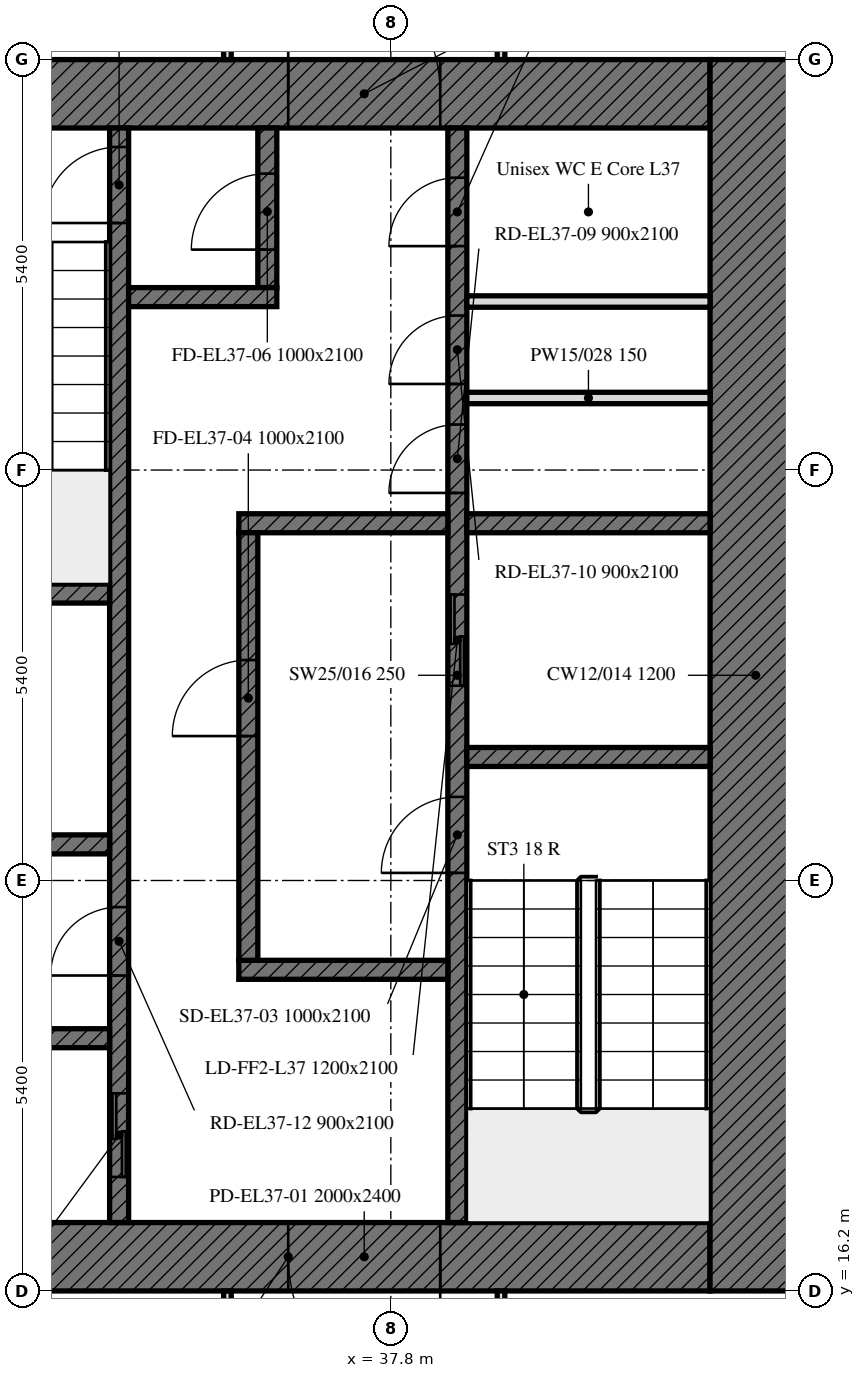
"""IFC4 building model, lengths in metres.
Left out: names, types, materials, properties, quantities, classifications, styles, units other than length and angle.
Written with IfcOpenShell. Run it as: python <this file> out.ifc"""

import sys

from ifc_helpers import new_model, si_unit, direction, frame, frame_2d, origin, place, context, subcontext, project, spatial, rectangle, extrude, element, fill, save


model = new_model("IFC4")
c1 = context("Model", 3, precision=1e-05, world=origin(), true_north=direction((0.0, 1.0)))
c2 = subcontext(c1, "Body", "Model", "MODEL_VIEW")
j1 = project(units=[si_unit("LENGTHUNIT", "METRE"), si_unit("PLANEANGLEUNIT", "RADIAN")], contexts=[c1])
p1 = place(None, origin())
s1 = spatial("IfcSite", under=j1, at=p1, CompositionType="ELEMENT")
p2 = place(p1, origin())
s2 = spatial("IfcBuilding", under=s1, at=p2, CompositionType="ELEMENT")
p3 = place(p2, frame((0.0, 0.0, 159.4)))
s3 = spatial("IfcBuildingStorey", under=s2, at=p3, CompositionType="ELEMENT", Elevation=159.4)
p4 = place(p3, frame((42.0, 16.65, 0.0), z_axis=(0.0, 0.0, 1.0), x_axis=(-1.0, 0.0, 0.0)))
e1 = element("IfcWall", 1, at=p4, inside=s3, PredefinedType="SOLIDWALL", context=c2, shape_type="SweptSolid", body=[
    extrude(rectangle(XDim=11.1, YDim=0.9, at=frame_2d((5.55, 0.0))), origin(), (0.0, 0.0, 1.0), 3.0),
])
p5 = place(p4, frame((3.55, 0.0, 0.0)))
e2 = element("IfcOpeningElement", 2, at=p5, cuts=e1, PredefinedType="OPENING", context=c2, shape_type="SweptSolid", body=[
    extrude(rectangle(XDim=2.0, YDim=2.4, at=frame_2d((1.0, 1.2))), frame((0.0, 0.45, 0.0), z_axis=(0.0, -1.0, 0.0), x_axis=(1.0, 0.0, 0.0)), (0.0, 0.0, 1.0), 0.9),
])
p6 = place(p3, frame((30.9, 31.95, 0.0), z_axis=(0.0, 0.0, 1.0), x_axis=(1.0, 0.0, 0.0)))
e3 = element("IfcWall", 3, at=p6, inside=s3, PredefinedType="SOLIDWALL", context=c2, shape_type="SweptSolid", body=[
    extrude(rectangle(XDim=11.1, YDim=0.9, at=frame_2d((5.55, 0.0))), origin(), (0.0, 0.0, 1.0), 3.0),
])
p7 = place(p6, frame((5.55, 0.0, 0.0)))
e4 = element("IfcOpeningElement", 4, at=p7, cuts=e3, PredefinedType="OPENING", context=c2, shape_type="SweptSolid", body=[
    extrude(rectangle(XDim=2.0, YDim=2.4, at=frame_2d((1.0, 1.2))), frame((0.0, 0.45, 0.0), z_axis=(0.0, -1.0, 0.0), x_axis=(1.0, 0.0, 0.0)), (0.0, 0.0, 1.0), 0.9),
])
p8 = place(p3, frame((42.6, 32.4, 0.0), z_axis=(0.0, 0.0, 1.0), x_axis=(0.0, -1.0, 0.0)))
e5 = element("IfcWall", 5, at=p8, inside=s3, PredefinedType="SOLIDWALL", context=c2, shape_type="SweptSolid", body=[
    extrude(rectangle(XDim=16.2, YDim=1.2, at=frame_2d((8.1, 0.0))), origin(), (0.0, 0.0, 1.0), 3.0),
])
p9 = place(p3, frame((38.675, 17.1, 0.0), z_axis=(0.0, 0.0, 1.0), x_axis=(0.0, 1.0, 0.0)))
e6 = element("IfcWall", 6, at=p9, inside=s3, PredefinedType="SOLIDWALL", context=c2, shape_type="SweptSolid", body=[
    extrude(rectangle(XDim=14.4, YDim=0.25, at=frame_2d((7.2, 0.0))), origin(), (0.0, 0.0, 1.0), 3.0),
])
p10 = place(p9, frame((4.6, 0.0, 0.0)))
e7 = element("IfcOpeningElement", 7, at=p10, cuts=e6, PredefinedType="OPENING", context=c2, shape_type="SweptSolid", body=[
    extrude(rectangle(XDim=1.0, YDim=2.1, at=frame_2d((0.5, 1.05))), frame((0.0, 0.125, 0.0), z_axis=(0.0, -1.0, 0.0), x_axis=(1.0, 0.0, 0.0)), (0.0, 0.0, 1.0), 0.25),
])
p11 = place(p9, frame((7.062, 0.0, 0.0)))
e8 = element("IfcOpeningElement", 8, at=p11, cuts=e6, PredefinedType="OPENING", context=c2, shape_type="SweptSolid", body=[
    extrude(rectangle(XDim=1.2, YDim=2.1, at=frame_2d((0.6, 1.05))), frame((0.0, 0.125, 0.0), z_axis=(0.0, -1.0, 0.0), x_axis=(1.0, 0.0, 0.0)), (0.0, 0.0, 1.0), 0.25),
])
p12 = place(p9, frame((9.599, 0.0, 0.0)))
e9 = element("IfcOpeningElement", 9, at=p12, cuts=e6, PredefinedType="OPENING", context=c2, shape_type="SweptSolid", body=[
    extrude(rectangle(XDim=0.9, YDim=2.1, at=frame_2d((0.45, 1.05))), frame((0.0, 0.125, 0.0), z_axis=(0.0, -1.0, 0.0), x_axis=(1.0, 0.0, 0.0)), (0.0, 0.0, 1.0), 0.25),
])
p13 = place(p9, frame((11.032, 0.0, 0.0)))
e10 = element("IfcOpeningElement", 10, at=p13, cuts=e6, PredefinedType="OPENING", context=c2, shape_type="SweptSolid", body=[
    extrude(rectangle(XDim=0.9, YDim=2.1, at=frame_2d((0.45, 1.05))), frame((0.0, 0.125, 0.0), z_axis=(0.0, -1.0, 0.0), x_axis=(1.0, 0.0, 0.0)), (0.0, 0.0, 1.0), 0.25),
])
p14 = place(p9, frame((12.846, 0.0, 0.0)))
e11 = element("IfcOpeningElement", 11, at=p14, cuts=e6, PredefinedType="OPENING", context=c2, shape_type="SweptSolid", body=[
    extrude(rectangle(XDim=0.9, YDim=2.1, at=frame_2d((0.45, 1.05))), frame((0.0, 0.125, 0.0), z_axis=(0.0, -1.0, 0.0), x_axis=(1.0, 0.0, 0.0)), (0.0, 0.0, 1.0), 0.25),
])
p15 = place(p3, frame((34.225, 17.1, 0.0), z_axis=(0.0, 0.0, 1.0), x_axis=(0.0, 1.0, 0.0)))
e12 = element("IfcWall", 12, at=p15, inside=s3, PredefinedType="SOLIDWALL", context=c2, shape_type="SweptSolid", body=[
    extrude(rectangle(XDim=14.4, YDim=0.25, at=frame_2d((7.2, 0.0))), origin(), (0.0, 0.0, 1.0), 3.0),
])
p16 = place(p15, frame((13.15, 0.0, 0.0)))
e13 = element("IfcOpeningElement", 13, at=p16, cuts=e12, PredefinedType="OPENING", context=c2, shape_type="SweptSolid", body=[
    extrude(rectangle(XDim=1.0, YDim=2.1, at=frame_2d((0.5, 1.05))), frame((0.0, 0.125, 0.0), z_axis=(0.0, -1.0, 0.0), x_axis=(1.0, 0.0, 0.0)), (0.0, 0.0, 1.0), 0.25),
])
p17 = place(p15, frame((0.6, 0.0, 0.0)))
e14 = element("IfcOpeningElement", 14, at=p17, cuts=e12, PredefinedType="OPENING", context=c2, shape_type="SweptSolid", body=[
    extrude(rectangle(XDim=1.1, YDim=2.1, at=frame_2d((0.55, 1.05))), frame((0.0, 0.125, 0.0), z_axis=(0.0, -1.0, 0.0), x_axis=(1.0, 0.0, 0.0)), (0.0, 0.0, 1.0), 0.25),
])
p18 = place(p15, frame((3.25, 0.0, 0.0)))
e15 = element("IfcOpeningElement", 15, at=p18, cuts=e12, PredefinedType="OPENING", context=c2, shape_type="SweptSolid", body=[
    extrude(rectangle(XDim=0.9, YDim=2.1, at=frame_2d((0.45, 1.05))), frame((0.0, 0.125, 0.0), z_axis=(0.0, -1.0, 0.0), x_axis=(1.0, 0.0, 0.0)), (0.0, 0.0, 1.0), 0.25),
])
p19 = place(p3, frame((38.8, 23.225, 0.0), z_axis=(0.0, 0.0, 1.0), x_axis=(1.0, 0.0, 0.0)))
e16 = element("IfcWall", 16, at=p19, inside=s3, PredefinedType="SOLIDWALL", context=c2, shape_type="SweptSolid", body=[
    extrude(rectangle(XDim=3.2, YDim=0.25, at=frame_2d((1.6, 0.0))), origin(), (0.0, 0.0, 1.0), 3.0),
])
for number, where, z_axis, x_axis in (
    (17, (30.9, 25.375, 0.0), (0.0, 0.0, 1.0), (1.0, 0.0, 0.0)),
    (18, (30.9, 22.075, 0.0), (0.0, 0.0, 1.0), (1.0, 0.0, 0.0)),
):
    element("IfcWall", number, at=place(p3, frame(where, z_axis=z_axis, x_axis=x_axis)), inside=s3, PredefinedType="SOLIDWALL", context=c2, shape_type="SweptSolid", body=[
        extrude(rectangle(XDim=3.2, YDim=0.25, at=frame_2d((1.6, 0.0))), origin(), (0.0, 0.0, 1.0), 3.0),
    ])
p20 = place(p3, frame((38.8, 26.3, 0.0), z_axis=(0.0, 0.0, 1.0), x_axis=(1.0, 0.0, 0.0)))
e19 = element("IfcWall", 19, at=p20, inside=s3, PredefinedType="SOLIDWALL", context=c2, shape_type="SweptSolid", body=[
    extrude(rectangle(XDim=3.2, YDim=0.25, at=frame_2d((1.6, 0.0))), origin(), (0.0, 0.0, 1.0), 3.0),
])
for number, where, z_axis, x_axis in (
    (20, (35.8, 26.3, 0.0), (0.0, 0.0, 1.0), (1.0, 0.0, 0.0)),
    (21, (35.8, 20.425, 0.0), (0.0, 0.0, 1.0), (1.0, 0.0, 0.0)),
):
    element("IfcWall", number, at=place(p3, frame(where, z_axis=z_axis, x_axis=x_axis)), inside=s3, PredefinedType="SOLIDWALL", context=c2, shape_type="SweptSolid", body=[
        extrude(rectangle(XDim=2.75, YDim=0.25, at=frame_2d((1.375, 0.0))), origin(), (0.0, 0.0, 1.0), 3.0),
    ])
p21 = place(p3, frame((36.175, 29.4, 0.0), z_axis=(0.0, 0.0, 1.0), x_axis=(0.0, 1.0, 0.0)))
e22 = element("IfcWall", 22, at=p21, inside=s3, PredefinedType="SOLIDWALL", context=c2, shape_type="SweptSolid", body=[
    extrude(rectangle(XDim=2.1, YDim=0.25, at=frame_2d((1.05, 0.0))), origin(), (0.0, 0.0, 1.0), 3.0),
])
p22 = place(p21, frame((0.5, 0.0, 0.0)))
e23 = element("IfcOpeningElement", 23, at=p22, cuts=e22, PredefinedType="OPENING", context=c2, shape_type="SweptSolid", body=[
    extrude(rectangle(XDim=1.0, YDim=2.1, at=frame_2d((0.5, 1.05))), frame((0.0, 0.125, 0.0), z_axis=(0.0, -1.0, 0.0), x_axis=(1.0, 0.0, 0.0)), (0.0, 0.0, 1.0), 0.25),
])
p23 = place(p3, frame((34.35, 29.275, 0.0), z_axis=(0.0, 0.0, 1.0), x_axis=(1.0, 0.0, 0.0)))
e24 = element("IfcWall", 24, at=p23, inside=s3, PredefinedType="SOLIDWALL", context=c2, shape_type="SweptSolid", body=[
    extrude(rectangle(XDim=1.95, YDim=0.25, at=frame_2d((0.975, 0.0))), origin(), (0.0, 0.0, 1.0), 3.0),
])
p24 = place(p3, frame((35.925, 20.55, 0.0), z_axis=(0.0, 0.0, 1.0), x_axis=(0.0, 1.0, 0.0)))
e25 = element("IfcWall", 25, at=p24, inside=s3, PredefinedType="SOLIDWALL", context=c2, shape_type="SweptSolid", body=[
    extrude(rectangle(XDim=5.625, YDim=0.25, at=frame_2d((2.812, 0.0))), origin(), (0.0, 0.0, 1.0), 3.0),
])
p25 = place(p24, frame((2.95, 0.0, 0.0)))
e26 = element("IfcOpeningElement", 26, at=p25, cuts=e25, PredefinedType="OPENING", context=c2, shape_type="SweptSolid", body=[
    extrude(rectangle(XDim=1.0, YDim=2.1, at=frame_2d((0.5, 1.05))), frame((0.0, 0.125, 0.0), z_axis=(0.0, -1.0, 0.0), x_axis=(1.0, 0.0, 0.0)), (0.0, 0.0, 1.0), 0.25),
])
p26 = place(p3, frame((30.9, 19.525, 0.0), z_axis=(0.0, 0.0, 1.0), x_axis=(1.0, 0.0, 0.0)))
e27 = element("IfcWall", 27, at=p26, inside=s3, PredefinedType="SOLIDWALL", context=c2, shape_type="SweptSolid", body=[
    extrude(rectangle(XDim=3.2, YDim=0.25, at=frame_2d((1.6, 0.0))), origin(), (0.0, 0.0, 1.0), 3.0),
])
for number, where, z_axis, x_axis in (
    (28, (38.8, 27.948, 0.0), (0.0, 0.0, 1.0), (1.0, 0.0, 0.0)),
    (29, (38.8, 29.217, 0.0), (0.0, 0.0, 1.0), (1.0, 0.0, 0.0)),
):
    element("IfcWall", number, at=place(p3, frame(where, z_axis=z_axis, x_axis=x_axis)), inside=s3, PredefinedType="PARTITIONING", context=c2, shape_type="SweptSolid", body=[
        extrude(rectangle(XDim=3.2, YDim=0.15, at=frame_2d((1.6, 0.0))), origin(), (0.0, 0.0, 1.0), 3.0),
    ])
for number, where, z_axis, x_axis in (
    (30, (35.65, 35.025, 0.0), (0.0, 0.0, 1.0), (0.0, -1.0, 0.0)),
    (31, (39.25, 32.4, 0.0), (0.0, 0.0, 1.0), (0.0, 1.0, 0.0)),
):
    element("IfcWall", number, at=place(p3, frame(where, z_axis=z_axis, x_axis=x_axis)), inside=s3, PredefinedType="PARTITIONING", context=c2, shape_type="SweptSolid", body=[
        extrude(rectangle(XDim=2.625, YDim=0.1, at=frame_2d((1.312, 0.0))), origin(), (0.0, 0.0, 1.0), 3.0),
    ])
for number, where, z_axis, x_axis in (
    (32, (35.65, 16.2, 0.0), (0.0, 0.0, 1.0), (0.0, -1.0, 0.0)),
    (33, (39.25, 9.075, 0.0), (0.0, 0.0, 1.0), (0.0, 1.0, 0.0)),
):
    element("IfcWall", number, at=place(p3, frame(where, z_axis=z_axis, x_axis=x_axis)), inside=s3, PredefinedType="PARTITIONING", context=c2, shape_type="SweptSolid", body=[
        extrude(rectangle(XDim=7.125, YDim=0.1, at=frame_2d((3.562, 0.0))), origin(), (0.0, 0.0, 1.0), 2.4),
    ])
p27 = place(p5, origin())
e34 = element("IfcDoor", 34, at=p27, inside=s3, OperationType="DOUBLE_DOOR_SINGLE_SWING", PredefinedType="DOOR", context=c2, shape_type="SweptSolid", body=[
    extrude(rectangle(XDim=2.0, YDim=2.4, at=frame_2d((1.0, 1.2))), frame((0.0, 0.025, 0.0), z_axis=(0.0, -1.0, 0.0), x_axis=(1.0, 0.0, 0.0)), (0.0, 0.0, 1.0), 0.05),
])
fill(e2, e34)
p28 = place(p7, origin())
e35 = element("IfcDoor", 35, at=p28, inside=s3, OperationType="DOUBLE_DOOR_SINGLE_SWING", PredefinedType="DOOR", context=c2, shape_type="SweptSolid", body=[
    extrude(rectangle(XDim=2.0, YDim=2.4, at=frame_2d((1.0, 1.2))), frame((0.0, 0.025, 0.0), z_axis=(0.0, -1.0, 0.0), x_axis=(1.0, 0.0, 0.0)), (0.0, 0.0, 1.0), 0.05),
])
fill(e4, e35)
p29 = place(p10, origin())
e36 = element("IfcDoor", 36, at=p29, inside=s3, OperationType="SINGLE_SWING_LEFT", PredefinedType="DOOR", context=c2, shape_type="SweptSolid", body=[
    extrude(rectangle(XDim=1.0, YDim=2.1, at=frame_2d((0.5, 1.05))), frame((0.0, 0.025, 0.0), z_axis=(0.0, -1.0, 0.0), x_axis=(1.0, 0.0, 0.0)), (0.0, 0.0, 1.0), 0.05),
])
fill(e7, e36)
p30 = place(p25, origin())
e37 = element("IfcDoor", 37, at=p30, inside=s3, OperationType="SINGLE_SWING_LEFT", PredefinedType="DOOR", context=c2, shape_type="SweptSolid", body=[
    extrude(rectangle(XDim=1.0, YDim=2.1, at=frame_2d((0.5, 1.05))), frame((0.0, 0.025, 0.0), z_axis=(0.0, -1.0, 0.0), x_axis=(1.0, 0.0, 0.0)), (0.0, 0.0, 1.0), 0.05),
])
fill(e26, e37)
p31 = place(p16, origin())
e38 = element("IfcDoor", 38, at=p31, inside=s3, OperationType="SINGLE_SWING_LEFT", PredefinedType="DOOR", context=c2, shape_type="SweptSolid", body=[
    extrude(rectangle(XDim=1.0, YDim=2.1, at=frame_2d((0.5, 1.05))), frame((0.0, 0.025, 0.0), z_axis=(0.0, -1.0, 0.0), x_axis=(1.0, 0.0, 0.0)), (0.0, 0.0, 1.0), 0.05),
])
fill(e13, e38)
p32 = place(p22, origin())
e39 = element("IfcDoor", 39, at=p32, inside=s3, OperationType="SINGLE_SWING_LEFT", PredefinedType="DOOR", context=c2, shape_type="SweptSolid", body=[
    extrude(rectangle(XDim=1.0, YDim=2.1, at=frame_2d((0.5, 1.05))), frame((0.0, 0.025, 0.0), z_axis=(0.0, -1.0, 0.0), x_axis=(1.0, 0.0, 0.0)), (0.0, 0.0, 1.0), 0.05),
])
fill(e23, e39)
p33 = place(p11, origin())
e40 = element("IfcDoor", 40, at=p33, inside=s3, OperationType="DOUBLE_DOOR_SLIDING", PredefinedType="DOOR", context=c2, shape_type="SweptSolid", body=[
    extrude(rectangle(XDim=1.2, YDim=2.1, at=frame_2d((0.6, 1.05))), frame((0.0, 0.025, 0.0), z_axis=(0.0, -1.0, 0.0), x_axis=(1.0, 0.0, 0.0)), (0.0, 0.0, 1.0), 0.05),
])
fill(e8, e40)
p34 = place(p17, origin())
e41 = element("IfcDoor", 41, at=p34, inside=s3, OperationType="DOUBLE_DOOR_SLIDING", PredefinedType="DOOR", context=c2, shape_type="SweptSolid", body=[
    extrude(rectangle(XDim=1.1, YDim=2.1, at=frame_2d((0.55, 1.05))), frame((0.0, 0.025, 0.0), z_axis=(0.0, -1.0, 0.0), x_axis=(1.0, 0.0, 0.0)), (0.0, 0.0, 1.0), 0.05),
])
fill(e14, e41)
p35 = place(p12, origin())
e42 = element("IfcDoor", 42, at=p35, inside=s3, OperationType="SINGLE_SWING_LEFT", PredefinedType="DOOR", context=c2, shape_type="SweptSolid", body=[
    extrude(rectangle(XDim=0.9, YDim=2.1, at=frame_2d((0.45, 1.05))), frame((0.0, 0.025, 0.0), z_axis=(0.0, -1.0, 0.0), x_axis=(1.0, 0.0, 0.0)), (0.0, 0.0, 1.0), 0.05),
])
fill(e9, e42)
p36 = place(p13, origin())
e43 = element("IfcDoor", 43, at=p36, inside=s3, OperationType="SINGLE_SWING_LEFT", PredefinedType="DOOR", context=c2, shape_type="SweptSolid", body=[
    extrude(rectangle(XDim=0.9, YDim=2.1, at=frame_2d((0.45, 1.05))), frame((0.0, 0.025, 0.0), z_axis=(0.0, -1.0, 0.0), x_axis=(1.0, 0.0, 0.0)), (0.0, 0.0, 1.0), 0.05),
])
fill(e10, e43)
p37 = place(p14, origin())
e44 = element("IfcDoor", 44, at=p37, inside=s3, OperationType="SINGLE_SWING_LEFT", PredefinedType="DOOR", context=c2, shape_type="SweptSolid", body=[
    extrude(rectangle(XDim=0.9, YDim=2.1, at=frame_2d((0.45, 1.05))), frame((0.0, 0.025, 0.0), z_axis=(0.0, -1.0, 0.0), x_axis=(1.0, 0.0, 0.0)), (0.0, 0.0, 1.0), 0.05),
])
fill(e11, e44)
p38 = place(p18, origin())
e45 = element("IfcDoor", 45, at=p38, inside=s3, OperationType="SINGLE_SWING_LEFT", PredefinedType="DOOR", context=c2, shape_type="SweptSolid", body=[
    extrude(rectangle(XDim=0.9, YDim=2.1, at=frame_2d((0.45, 1.05))), frame((0.0, 0.025, 0.0), z_axis=(0.0, -1.0, 0.0), x_axis=(1.0, 0.0, 0.0)), (0.0, 0.0, 1.0), 0.05),
])
fill(e15, e45)
save(model, sys.argv[1])
